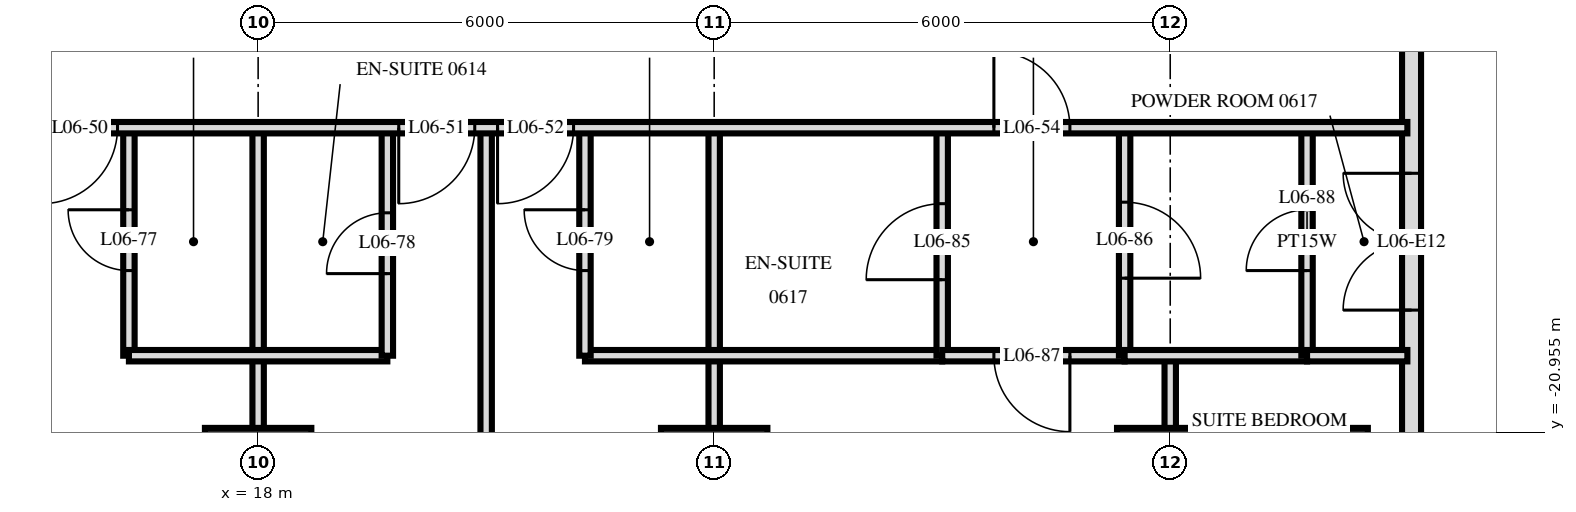
"""IFC4 building model, lengths in metres.
Left out: names, types, materials, properties, quantities, classifications, styles, units other than length and angle.
Written with IfcOpenShell. Run it as: python <this file> out.ifc"""

import sys

from ifc_helpers import new_model, si_unit, direction, frame, frame_2d, origin, origin_2d, place, context, subcontext, project, spatial, rectangle, extrude, element, fill, save


model = new_model("IFC4")
c1 = context("Model", 3, precision=1e-05, world=origin(), true_north=direction((0.0, 1.0)))
c2 = subcontext(c1, "Body", "Model", "MODEL_VIEW")
j1 = project(units=[si_unit("LENGTHUNIT", "METRE"), si_unit("PLANEANGLEUNIT", "RADIAN")], contexts=[c1])
p1 = place(None, origin())
s1 = spatial("IfcSite", under=j1, at=p1, CompositionType="ELEMENT")
p2 = place(p1, origin())
s2 = spatial("IfcBuilding", under=s1, at=p2, CompositionType="ELEMENT")
p3 = place(p2, frame((0.0, 0.0, 31.2)))
s3 = spatial("IfcBuildingStorey", under=s2, at=p3, CompositionType="ELEMENT", Elevation=31.2)
for number, where, z_axis, x_axis in (
    (1, (18.0, -21.6, 0.0), (0.0, 0.0, 1.0), (1.0, 0.0, 0.0)),
    (2, (24.0, -21.6, 0.0), (0.0, 0.0, 1.0), (1.0, 0.0, 0.0)),
    (3, (30.0, -21.6, 0.0), (0.0, 0.0, 1.0), (1.0, 0.0, 0.0)),
):
    element("IfcColumn", number, at=place(p3, frame(where, z_axis=z_axis, x_axis=x_axis)), inside=s3, PredefinedType="COLUMN", context=c2, shape_type="SweptSolid", body=[
        extrude(rectangle(XDim=1.4, YDim=1.4, at=origin_2d()), origin(), (0.0, 0.0, 1.0), 3.6),
    ])
p4 = place(p3, frame((32.1, -21.6, 0.0), z_axis=(0.0, 0.0, 1.0), x_axis=(0.0, 1.0, 0.0)))
e4 = element("IfcColumn", 4, at=p4, inside=s3, PredefinedType="COLUMN", context=c2, shape_type="SweptSolid", body=[
    extrude(rectangle(XDim=1.4, YDim=1.0, at=origin_2d()), origin(), (0.0, 0.0, 1.0), 3.6),
])
p5 = place(p3, frame((33.175, -24.875, 0.0), z_axis=(0.0, 0.0, 1.0), x_axis=(0.0, 1.0, 0.0)))
e5 = element("IfcWall", 5, at=p5, inside=s3, PredefinedType="SOLIDWALL", context=c2, shape_type="SweptSolid", body=[
    extrude(rectangle(XDim=21.551, YDim=0.25, at=frame_2d((10.775, 0.0))), origin(), (0.0, 0.0, 1.0), 3.32),
])
p6 = place(p5, frame((0.575, 0.0, 0.0)))
e6 = element("IfcOpeningElement", 6, at=p6, cuts=e5, PredefinedType="OPENING", context=c2, shape_type="SweptSolid", body=[
    extrude(rectangle(XDim=1.8, YDim=2.4, at=frame_2d((0.9, 1.2))), frame((0.0, 0.135, 0.0), z_axis=(0.0, -1.0, 0.0), x_axis=(1.0, 0.0, 0.0)), (0.0, 0.0, 1.0), 0.27),
])
p7 = place(p5, frame((5.525, 0.0, 0.0)))
e7 = element("IfcOpeningElement", 7, at=p7, cuts=e5, PredefinedType="OPENING", context=c2, shape_type="SweptSolid", body=[
    extrude(rectangle(XDim=1.8, YDim=2.4, at=frame_2d((0.9, 1.2))), frame((0.0, 0.135, 0.0), z_axis=(0.0, -1.0, 0.0), x_axis=(1.0, 0.0, 0.0)), (0.0, 0.0, 1.0), 0.27),
])
p8 = place(p5, frame((12.725, 0.0, 0.0)))
e8 = element("IfcOpeningElement", 8, at=p8, cuts=e5, PredefinedType="OPENING", context=c2, shape_type="SweptSolid", body=[
    extrude(rectangle(XDim=1.8, YDim=2.4, at=frame_2d((0.9, 1.2))), frame((0.0, 0.135, 0.0), z_axis=(0.0, -1.0, 0.0), x_axis=(1.0, 0.0, 0.0)), (0.0, 0.0, 1.0), 0.27),
])
p9 = place(p3, frame((31.8, -19.95, 0.0), z_axis=(0.0, 0.0, 1.0), x_axis=(0.0, 1.0, 0.0)))
e9 = element("IfcWall", 9, at=p9, inside=s3, PredefinedType="PLUMBINGWALL", context=c2, shape_type="SweptSolid", body=[
    extrude(rectangle(XDim=3.0, YDim=0.15, at=frame_2d((1.5, 0.0))), origin(), (0.0, 0.0, 1.0), 3.32),
])
p10 = place(p9, frame((1.12, 0.0, 0.0)))
e10 = element("IfcOpeningElement", 10, at=p10, cuts=e9, PredefinedType="OPENING", context=c2, shape_type="SweptSolid", body=[
    extrude(rectangle(XDim=0.8, YDim=2.1, at=frame_2d((0.4, 1.05))), frame((0.0, 0.085, 0.0), z_axis=(0.0, -1.0, 0.0), x_axis=(1.0, 0.0, 0.0)), (0.0, 0.0, 1.0), 0.17),
])
p11 = place(p3, frame((30.0, -28.978, 0.0), z_axis=(0.0, 0.0, 1.0), x_axis=(0.0, 1.0, 0.0)))
e11 = element("IfcWall", 11, at=p11, inside=s3, PredefinedType="PARTITIONING", context=c2, shape_type="SweptSolid", body=[
    extrude(rectangle(XDim=9.028, YDim=0.15, at=frame_2d((4.514, 0.0))), origin(), (0.0, 0.0, 1.0), 3.32),
])
p12 = place(p11, frame((3.958, 0.0, 0.0)))
e12 = element("IfcOpeningElement", 12, at=p12, cuts=e11, PredefinedType="OPENING", context=c2, shape_type="SweptSolid", body=[
    extrude(rectangle(XDim=0.9, YDim=2.1, at=frame_2d((0.45, 1.05))), frame((0.0, 0.085, 0.0), z_axis=(0.0, -1.0, 0.0), x_axis=(1.0, 0.0, 0.0)), (0.0, 0.0, 1.0), 0.17),
])
p13 = place(p3, frame((29.4, -19.95, 0.0), z_axis=(0.0, 0.0, 1.0), x_axis=(0.0, 1.0, 0.0)))
e13 = element("IfcWall", 13, at=p13, inside=s3, PredefinedType="PARTITIONING", context=c2, shape_type="SweptSolid", body=[
    extrude(rectangle(XDim=3.0, YDim=0.15, at=frame_2d((1.5, 0.0))), origin(), (0.0, 0.0, 1.0), 3.32),
])
p14 = place(p13, frame((1.02, 0.0, 0.0)))
e14 = element("IfcOpeningElement", 14, at=p14, cuts=e13, PredefinedType="OPENING", context=c2, shape_type="SweptSolid", body=[
    extrude(rectangle(XDim=1.0, YDim=2.1, at=frame_2d((0.5, 1.05))), frame((0.0, 0.085, 0.0), z_axis=(0.0, -1.0, 0.0), x_axis=(1.0, 0.0, 0.0)), (0.0, 0.0, 1.0), 0.17),
])
p15 = place(p3, frame((27.0, -19.95, 0.0), z_axis=(0.0, 0.0, 1.0), x_axis=(0.0, 1.0, 0.0)))
e15 = element("IfcWall", 15, at=p15, inside=s3, PredefinedType="PARTITIONING", context=c2, shape_type="SweptSolid", body=[
    extrude(rectangle(XDim=3.0, YDim=0.15, at=frame_2d((1.5, 0.0))), origin(), (0.0, 0.0, 1.0), 3.32),
])
p16 = place(p15, frame((1.0, 0.0, 0.0)))
e16 = element("IfcOpeningElement", 16, at=p16, cuts=e15, PredefinedType="OPENING", context=c2, shape_type="SweptSolid", body=[
    extrude(rectangle(XDim=1.0, YDim=2.1, at=frame_2d((0.5, 1.05))), frame((0.0, 0.085, 0.0), z_axis=(0.0, -1.0, 0.0), x_axis=(1.0, 0.0, 0.0)), (0.0, 0.0, 1.0), 0.17),
])
p17 = place(p3, frame((24.0, -29.22, 0.0), z_axis=(0.0, 0.0, 1.0), x_axis=(0.0, 1.0, 0.0)))
e17 = element("IfcWall", 17, at=p17, inside=s3, PredefinedType="PARTITIONING", context=c2, shape_type="SweptSolid", body=[
    extrude(rectangle(XDim=12.27, YDim=0.15, at=frame_2d((6.135, 0.0))), origin(), (0.0, 0.0, 1.0), 3.32),
])
p18 = place(p3, frame((22.3, -19.95, 0.0), z_axis=(0.0, 0.0, 1.0), x_axis=(0.0, 1.0, 0.0)))
e18 = element("IfcWall", 18, at=p18, inside=s3, PredefinedType="PARTITIONING", context=c2, shape_type="SweptSolid", body=[
    extrude(rectangle(XDim=3.0, YDim=0.15, at=frame_2d((1.5, 0.0))), origin(), (0.0, 0.0, 1.0), 3.32),
])
p19 = place(p18, frame((1.12, 0.0, 0.0)))
e19 = element("IfcOpeningElement", 19, at=p19, cuts=e18, PredefinedType="OPENING", context=c2, shape_type="SweptSolid", body=[
    extrude(rectangle(XDim=0.8, YDim=2.1, at=frame_2d((0.4, 1.05))), frame((0.0, 0.085, 0.0), z_axis=(0.0, -1.0, 0.0), x_axis=(1.0, 0.0, 0.0)), (0.0, 0.0, 1.0), 0.17),
])
p20 = place(p3, frame((21.0, -29.22, 0.0), z_axis=(0.0, 0.0, 1.0), x_axis=(0.0, 1.0, 0.0)))
e20 = element("IfcWall", 20, at=p20, inside=s3, PredefinedType="PARTITIONING", context=c2, shape_type="SweptSolid", body=[
    extrude(rectangle(XDim=12.27, YDim=0.15, at=frame_2d((6.135, 0.0))), origin(), (0.0, 0.0, 1.0), 3.32),
])
p21 = place(p3, frame((19.7, -19.95, 0.0), z_axis=(0.0, 0.0, 1.0), x_axis=(0.0, 1.0, 0.0)))
e21 = element("IfcWall", 21, at=p21, inside=s3, PredefinedType="PARTITIONING", context=c2, shape_type="SweptSolid", body=[
    extrude(rectangle(XDim=3.0, YDim=0.15, at=frame_2d((1.5, 0.0))), origin(), (0.0, 0.0, 1.0), 3.32),
])
p22 = place(p21, frame((1.08, 0.0, 0.0)))
e22 = element("IfcOpeningElement", 22, at=p22, cuts=e21, PredefinedType="OPENING", context=c2, shape_type="SweptSolid", body=[
    extrude(rectangle(XDim=0.8, YDim=2.1, at=frame_2d((0.4, 1.05))), frame((0.0, 0.085, 0.0), z_axis=(0.0, -1.0, 0.0), x_axis=(1.0, 0.0, 0.0)), (0.0, 0.0, 1.0), 0.17),
])
p23 = place(p3, frame((18.0, -29.22, 0.0), z_axis=(0.0, 0.0, 1.0), x_axis=(0.0, 1.0, 0.0)))
e23 = element("IfcWall", 23, at=p23, inside=s3, PredefinedType="PARTITIONING", context=c2, shape_type="SweptSolid", body=[
    extrude(rectangle(XDim=12.27, YDim=0.15, at=frame_2d((6.135, 0.0))), origin(), (0.0, 0.0, 1.0), 3.32),
])
p24 = place(p3, frame((16.3, -19.95, 0.0), z_axis=(0.0, 0.0, 1.0), x_axis=(0.0, 1.0, 0.0)))
e24 = element("IfcWall", 24, at=p24, inside=s3, PredefinedType="PARTITIONING", context=c2, shape_type="SweptSolid", body=[
    extrude(rectangle(XDim=3.0, YDim=0.15, at=frame_2d((1.5, 0.0))), origin(), (0.0, 0.0, 1.0), 3.32),
])
p25 = place(p24, frame((1.12, 0.0, 0.0)))
e25 = element("IfcOpeningElement", 25, at=p25, cuts=e24, PredefinedType="OPENING", context=c2, shape_type="SweptSolid", body=[
    extrude(rectangle(XDim=0.8, YDim=2.1, at=frame_2d((0.4, 1.05))), frame((0.0, 0.085, 0.0), z_axis=(0.0, -1.0, 0.0), x_axis=(1.0, 0.0, 0.0)), (0.0, 0.0, 1.0), 0.17),
])
p26 = place(p3, frame((27.0, -19.95, 0.0), z_axis=(0.0, 0.0, 1.0), x_axis=(1.0, 0.0, 0.0)))
e26 = element("IfcWall", 26, at=p26, inside=s3, PredefinedType="PARTITIONING", context=c2, shape_type="SweptSolid", body=[
    extrude(rectangle(XDim=2.4, YDim=0.15, at=frame_2d((1.2, 0.0))), origin(), (0.0, 0.0, 1.0), 3.32),
])
p27 = place(p26, frame((0.68, 0.0, 0.0)))
e27 = element("IfcOpeningElement", 27, at=p27, cuts=e26, PredefinedType="OPENING", context=c2, shape_type="SweptSolid", body=[
    extrude(rectangle(XDim=1.0, YDim=2.1, at=frame_2d((0.5, 1.05))), frame((0.0, 0.085, 0.0), z_axis=(0.0, -1.0, 0.0), x_axis=(1.0, 0.0, 0.0)), (0.0, 0.0, 1.0), 0.17),
])
p28 = place(p3, frame((16.3, -19.95, 0.0), z_axis=(0.0, 0.0, 1.0), x_axis=(1.0, 0.0, 0.0)))
e28 = element("IfcWall", 28, at=p28, inside=s3, PredefinedType="PARTITIONING", context=c2, shape_type="SweptSolid", body=[
    extrude(rectangle(XDim=3.4, YDim=0.15, at=frame_2d((1.7, 0.0))), origin(), (0.0, 0.0, 1.0), 3.32),
])
p29 = place(p3, frame((22.3, -19.95, 0.0), z_axis=(0.0, 0.0, 1.0), x_axis=(1.0, 0.0, 0.0)))
e29 = element("IfcWall", 29, at=p29, inside=s3, PredefinedType="PARTITIONING", context=c2, shape_type="SweptSolid", body=[
    extrude(rectangle(XDim=4.7, YDim=0.15, at=frame_2d((2.35, 0.0))), origin(), (0.0, 0.0, 1.0), 3.32),
])
p30 = place(p3, frame((29.4, -19.95, 0.0), z_axis=(0.0, 0.0, 1.0), x_axis=(1.0, 0.0, 0.0)))
e30 = element("IfcWall", 30, at=p30, inside=s3, PredefinedType="PARTITIONING", context=c2, shape_type="SweptSolid", body=[
    extrude(rectangle(XDim=2.4, YDim=0.15, at=frame_2d((1.2, 0.0))), origin(), (0.0, 0.0, 1.0), 3.32),
])
p31 = place(p3, frame((31.8, -19.95, 0.0), z_axis=(0.0, 0.0, 1.0), x_axis=(1.0, 0.0, 0.0)))
e31 = element("IfcWall", 31, at=p31, inside=s3, PredefinedType="PLUMBINGWALL", context=c2, shape_type="SweptSolid", body=[
    extrude(rectangle(XDim=1.32, YDim=0.15, at=frame_2d((0.66, 0.0))), origin(), (0.0, 0.0, 1.0), 3.32),
])
p32 = place(p3, frame((-33.12, -16.95, 0.0), z_axis=(0.0, 0.0, 1.0), x_axis=(1.0, 0.0, 0.0)))
e32 = element("IfcWall", 32, at=p32, inside=s3, PredefinedType="PARTITIONING", context=c2, shape_type="SweptSolid", body=[
    extrude(rectangle(XDim=66.24, YDim=0.15, at=frame_2d((33.12, 0.0))), origin(), (0.0, 0.0, 1.0), 3.32),
])
p33 = place(p32, frame((9.27, 0.0, 0.0)))
e33 = element("IfcOpeningElement", 33, at=p33, cuts=e32, PredefinedType="OPENING", context=c2, shape_type="SweptSolid", body=[
    extrude(rectangle(XDim=1.0, YDim=2.1, at=frame_2d((0.5, 1.05))), frame((0.0, 0.085, 0.0), z_axis=(0.0, -1.0, 0.0), x_axis=(1.0, 0.0, 0.0)), (0.0, 0.0, 1.0), 0.17),
])
p34 = place(p32, frame((13.97, 0.0, 0.0)))
e34 = element("IfcOpeningElement", 34, at=p34, cuts=e32, PredefinedType="OPENING", context=c2, shape_type="SweptSolid", body=[
    extrude(rectangle(XDim=1.0, YDim=2.1, at=frame_2d((0.5, 1.05))), frame((0.0, 0.085, 0.0), z_axis=(0.0, -1.0, 0.0), x_axis=(1.0, 0.0, 0.0)), (0.0, 0.0, 1.0), 0.17),
])
p35 = place(p32, frame((15.27, 0.0, 0.0)))
e35 = element("IfcOpeningElement", 35, at=p35, cuts=e32, PredefinedType="OPENING", context=c2, shape_type="SweptSolid", body=[
    extrude(rectangle(XDim=1.0, YDim=2.1, at=frame_2d((0.5, 1.05))), frame((0.0, 0.085, 0.0), z_axis=(0.0, -1.0, 0.0), x_axis=(1.0, 0.0, 0.0)), (0.0, 0.0, 1.0), 0.17),
])
p36 = place(p32, frame((19.97, 0.0, 0.0)))
e36 = element("IfcOpeningElement", 36, at=p36, cuts=e32, PredefinedType="OPENING", context=c2, shape_type="SweptSolid", body=[
    extrude(rectangle(XDim=1.0, YDim=2.1, at=frame_2d((0.5, 1.05))), frame((0.0, 0.085, 0.0), z_axis=(0.0, -1.0, 0.0), x_axis=(1.0, 0.0, 0.0)), (0.0, 0.0, 1.0), 0.17),
])
p37 = place(p32, frame((22.27, 0.0, 0.0)))
e37 = element("IfcOpeningElement", 37, at=p37, cuts=e32, PredefinedType="OPENING", context=c2, shape_type="SweptSolid", body=[
    extrude(rectangle(XDim=1.0, YDim=2.1, at=frame_2d((0.5, 1.05))), frame((0.0, 0.085, 0.0), z_axis=(0.0, -1.0, 0.0), x_axis=(1.0, 0.0, 0.0)), (0.0, 0.0, 1.0), 0.17),
])
p38 = place(p32, frame((28.97, 0.0, 0.0)))
e38 = element("IfcOpeningElement", 38, at=p38, cuts=e32, PredefinedType="OPENING", context=c2, shape_type="SweptSolid", body=[
    extrude(rectangle(XDim=1.0, YDim=2.1, at=frame_2d((0.5, 1.05))), frame((0.0, 0.085, 0.0), z_axis=(0.0, -1.0, 0.0), x_axis=(1.0, 0.0, 0.0)), (0.0, 0.0, 1.0), 0.17),
])
p39 = place(p32, frame((30.27, 0.0, 0.0)))
e39 = element("IfcOpeningElement", 39, at=p39, cuts=e32, PredefinedType="OPENING", context=c2, shape_type="SweptSolid", body=[
    extrude(rectangle(XDim=1.0, YDim=2.1, at=frame_2d((0.5, 1.05))), frame((0.0, 0.085, 0.0), z_axis=(0.0, -1.0, 0.0), x_axis=(1.0, 0.0, 0.0)), (0.0, 0.0, 1.0), 0.17),
])
p40 = place(p32, frame((34.97, 0.0, 0.0)))
e40 = element("IfcOpeningElement", 40, at=p40, cuts=e32, PredefinedType="OPENING", context=c2, shape_type="SweptSolid", body=[
    extrude(rectangle(XDim=1.0, YDim=2.1, at=frame_2d((0.5, 1.05))), frame((0.0, 0.085, 0.0), z_axis=(0.0, -1.0, 0.0), x_axis=(1.0, 0.0, 0.0)), (0.0, 0.0, 1.0), 0.17),
])
p41 = place(p32, frame((36.27, 0.0, 0.0)))
e41 = element("IfcOpeningElement", 41, at=p41, cuts=e32, PredefinedType="OPENING", context=c2, shape_type="SweptSolid", body=[
    extrude(rectangle(XDim=1.0, YDim=2.1, at=frame_2d((0.5, 1.05))), frame((0.0, 0.085, 0.0), z_axis=(0.0, -1.0, 0.0), x_axis=(1.0, 0.0, 0.0)), (0.0, 0.0, 1.0), 0.17),
])
p42 = place(p32, frame((40.97, 0.0, 0.0)))
e42 = element("IfcOpeningElement", 42, at=p42, cuts=e32, PredefinedType="OPENING", context=c2, shape_type="SweptSolid", body=[
    extrude(rectangle(XDim=1.0, YDim=2.1, at=frame_2d((0.5, 1.05))), frame((0.0, 0.085, 0.0), z_axis=(0.0, -1.0, 0.0), x_axis=(1.0, 0.0, 0.0)), (0.0, 0.0, 1.0), 0.17),
])
p43 = place(p32, frame((42.27, 0.0, 0.0)))
e43 = element("IfcOpeningElement", 43, at=p43, cuts=e32, PredefinedType="OPENING", context=c2, shape_type="SweptSolid", body=[
    extrude(rectangle(XDim=1.0, YDim=2.1, at=frame_2d((0.5, 1.05))), frame((0.0, 0.085, 0.0), z_axis=(0.0, -1.0, 0.0), x_axis=(1.0, 0.0, 0.0)), (0.0, 0.0, 1.0), 0.17),
])
p44 = place(p32, frame((46.97, 0.0, 0.0)))
e44 = element("IfcOpeningElement", 44, at=p44, cuts=e32, PredefinedType="OPENING", context=c2, shape_type="SweptSolid", body=[
    extrude(rectangle(XDim=1.0, YDim=2.1, at=frame_2d((0.5, 1.05))), frame((0.0, 0.085, 0.0), z_axis=(0.0, -1.0, 0.0), x_axis=(1.0, 0.0, 0.0)), (0.0, 0.0, 1.0), 0.17),
])
p45 = place(p32, frame((48.27, 0.0, 0.0)))
e45 = element("IfcOpeningElement", 45, at=p45, cuts=e32, PredefinedType="OPENING", context=c2, shape_type="SweptSolid", body=[
    extrude(rectangle(XDim=1.0, YDim=2.1, at=frame_2d((0.5, 1.05))), frame((0.0, 0.085, 0.0), z_axis=(0.0, -1.0, 0.0), x_axis=(1.0, 0.0, 0.0)), (0.0, 0.0, 1.0), 0.17),
])
p46 = place(p32, frame((52.97, 0.0, 0.0)))
e46 = element("IfcOpeningElement", 46, at=p46, cuts=e32, PredefinedType="OPENING", context=c2, shape_type="SweptSolid", body=[
    extrude(rectangle(XDim=1.0, YDim=2.1, at=frame_2d((0.5, 1.05))), frame((0.0, 0.085, 0.0), z_axis=(0.0, -1.0, 0.0), x_axis=(1.0, 0.0, 0.0)), (0.0, 0.0, 1.0), 0.17),
])
p47 = place(p32, frame((54.27, 0.0, 0.0)))
e47 = element("IfcOpeningElement", 47, at=p47, cuts=e32, PredefinedType="OPENING", context=c2, shape_type="SweptSolid", body=[
    extrude(rectangle(XDim=1.0, YDim=2.1, at=frame_2d((0.5, 1.05))), frame((0.0, 0.085, 0.0), z_axis=(0.0, -1.0, 0.0), x_axis=(1.0, 0.0, 0.0)), (0.0, 0.0, 1.0), 0.17),
])
p48 = place(p32, frame((4.4, 0.0, 0.0)))
e48 = element("IfcOpeningElement", 48, at=p48, cuts=e32, PredefinedType="OPENING", context=c2, shape_type="SweptSolid", body=[
    extrude(rectangle(XDim=1.0, YDim=2.1, at=frame_2d((0.5, 1.05))), frame((0.0, 0.085, 0.0), z_axis=(0.0, -1.0, 0.0), x_axis=(1.0, 0.0, 0.0)), (0.0, 0.0, 1.0), 0.17),
])
p49 = place(p32, frame((60.8, 0.0, 0.0)))
e49 = element("IfcOpeningElement", 49, at=p49, cuts=e32, PredefinedType="OPENING", context=c2, shape_type="SweptSolid", body=[
    extrude(rectangle(XDim=1.0, YDim=2.1, at=frame_2d((0.5, 1.05))), frame((0.0, 0.085, 0.0), z_axis=(0.0, -1.0, 0.0), x_axis=(1.0, 0.0, 0.0)), (0.0, 0.0, 1.0), 0.17),
])
p50 = place(p7, origin())
e50 = element("IfcDoor", 50, at=p50, inside=s3, OperationType="DOUBLE_DOOR_SINGLE_SWING", PredefinedType="DOOR", context=c2, shape_type="SweptSolid", body=[
    extrude(rectangle(XDim=1.8, YDim=2.4, at=frame_2d((0.9, 1.2))), frame((0.0, 0.025, 0.0), z_axis=(0.0, -1.0, 0.0), x_axis=(1.0, 0.0, 0.0)), (0.0, 0.0, 1.0), 0.05),
])
fill(e7, e50)
p51 = place(p45, frame((0.5, 0.0, 0.0), z_axis=(0.0, 0.0, 1.0), x_axis=(-1.0, 0.0, 0.0)))
e51 = element("IfcDoor", 51, at=p51, inside=s3, OperationType="SINGLE_SWING_LEFT", PredefinedType="DOOR", context=c2, shape_type="SweptSolid", body=[
    extrude(rectangle(XDim=1.0, YDim=2.1, at=frame_2d((0.0, 1.05))), frame((0.0, -0.025, 0.0), z_axis=(0.0, 1.0, 0.0), x_axis=(-1.0, 0.0, 0.0)), (0.0, 0.0, 1.0), 0.05),
])
fill(e45, e51)
p52 = place(p46, frame((0.5, 0.0, 0.0), z_axis=(0.0, 0.0, 1.0), x_axis=(-1.0, 0.0, 0.0)))
e52 = element("IfcDoor", 52, at=p52, inside=s3, OperationType="SINGLE_SWING_LEFT", PredefinedType="DOOR", context=c2, shape_type="SweptSolid", body=[
    extrude(rectangle(XDim=1.0, YDim=2.1, at=frame_2d((0.0, 1.05))), frame((0.0, -0.025, 0.0), z_axis=(0.0, 1.0, 0.0), x_axis=(-1.0, 0.0, 0.0)), (0.0, 0.0, 1.0), 0.05),
])
fill(e46, e52)
p53 = place(p47, frame((0.5, 0.0, 0.0), z_axis=(0.0, 0.0, 1.0), x_axis=(-1.0, 0.0, 0.0)))
e53 = element("IfcDoor", 53, at=p53, inside=s3, OperationType="SINGLE_SWING_LEFT", PredefinedType="DOOR", context=c2, shape_type="SweptSolid", body=[
    extrude(rectangle(XDim=1.0, YDim=2.1, at=frame_2d((0.0, 1.05))), frame((0.0, -0.025, 0.0), z_axis=(0.0, 1.0, 0.0), x_axis=(-1.0, 0.0, 0.0)), (0.0, 0.0, 1.0), 0.05),
])
fill(e47, e53)
p54 = place(p49, origin())
e54 = element("IfcDoor", 54, at=p54, inside=s3, OperationType="SINGLE_SWING_RIGHT", PredefinedType="DOOR", context=c2, shape_type="SweptSolid", body=[
    extrude(rectangle(XDim=1.0, YDim=2.1, at=frame_2d((0.5, 1.05))), frame((0.0, 0.025, 0.0), z_axis=(0.0, -1.0, 0.0), x_axis=(1.0, 0.0, 0.0)), (0.0, 0.0, 1.0), 0.05),
])
fill(e49, e54)
p55 = place(p25, origin())
e55 = element("IfcDoor", 55, at=p55, inside=s3, OperationType="SINGLE_SWING_LEFT", PredefinedType="DOOR", context=c2, shape_type="SweptSolid", body=[
    extrude(rectangle(XDim=0.8, YDim=2.1, at=frame_2d((0.4, 1.05))), frame((0.0, 0.025, 0.0), z_axis=(0.0, -1.0, 0.0), x_axis=(1.0, 0.0, 0.0)), (0.0, 0.0, 1.0), 0.05),
])
fill(e25, e55)
p56 = place(p22, origin())
e56 = element("IfcDoor", 56, at=p56, inside=s3, OperationType="SINGLE_SWING_RIGHT", PredefinedType="DOOR", context=c2, shape_type="SweptSolid", body=[
    extrude(rectangle(XDim=0.8, YDim=2.1, at=frame_2d((0.4, 1.05))), frame((0.0, 0.025, 0.0), z_axis=(0.0, -1.0, 0.0), x_axis=(1.0, 0.0, 0.0)), (0.0, 0.0, 1.0), 0.05),
])
fill(e22, e56)
p57 = place(p19, origin())
e57 = element("IfcDoor", 57, at=p57, inside=s3, OperationType="SINGLE_SWING_LEFT", PredefinedType="DOOR", context=c2, shape_type="SweptSolid", body=[
    extrude(rectangle(XDim=0.8, YDim=2.1, at=frame_2d((0.4, 1.05))), frame((0.0, 0.025, 0.0), z_axis=(0.0, -1.0, 0.0), x_axis=(1.0, 0.0, 0.0)), (0.0, 0.0, 1.0), 0.05),
])
fill(e19, e57)
p58 = place(p16, origin())
e58 = element("IfcDoor", 58, at=p58, inside=s3, OperationType="SINGLE_SWING_RIGHT", PredefinedType="DOOR", context=c2, shape_type="SweptSolid", body=[
    extrude(rectangle(XDim=1.0, YDim=2.1, at=frame_2d((0.5, 1.05))), frame((0.0, 0.025, 0.0), z_axis=(0.0, -1.0, 0.0), x_axis=(1.0, 0.0, 0.0)), (0.0, 0.0, 1.0), 0.05),
])
fill(e16, e58)
p59 = place(p14, frame((0.5, 0.0, 0.0), z_axis=(0.0, 0.0, 1.0), x_axis=(-1.0, 0.0, 0.0)))
e59 = element("IfcDoor", 59, at=p59, inside=s3, OperationType="SINGLE_SWING_LEFT", PredefinedType="DOOR", context=c2, shape_type="SweptSolid", body=[
    extrude(rectangle(XDim=1.0, YDim=2.1, at=frame_2d((0.0, 1.05))), frame((0.0, -0.025, 0.0), z_axis=(0.0, 1.0, 0.0), x_axis=(-1.0, 0.0, 0.0)), (0.0, 0.0, 1.0), 0.05),
])
fill(e14, e59)
p60 = place(p27, frame((0.5, 0.0, 0.0), z_axis=(0.0, 0.0, 1.0), x_axis=(-1.0, 0.0, 0.0)))
e60 = element("IfcDoor", 60, at=p60, inside=s3, OperationType="SINGLE_SWING_RIGHT", PredefinedType="DOOR", context=c2, shape_type="SweptSolid", body=[
    extrude(rectangle(XDim=1.0, YDim=2.1, at=frame_2d((0.0, 1.05))), frame((0.0, -0.025, 0.0), z_axis=(0.0, 1.0, 0.0), x_axis=(-1.0, 0.0, 0.0)), (0.0, 0.0, 1.0), 0.05),
])
fill(e27, e60)
p61 = place(p10, origin())
e61 = element("IfcDoor", 61, at=p61, inside=s3, OperationType="SINGLE_SWING_RIGHT", PredefinedType="DOOR", context=c2, shape_type="SweptSolid", body=[
    extrude(rectangle(XDim=0.8, YDim=2.1, at=frame_2d((0.4, 1.05))), frame((0.0, 0.025, 0.0), z_axis=(0.0, -1.0, 0.0), x_axis=(1.0, 0.0, 0.0)), (0.0, 0.0, 1.0), 0.05),
])
fill(e10, e61)
save(model, sys.argv[1])
